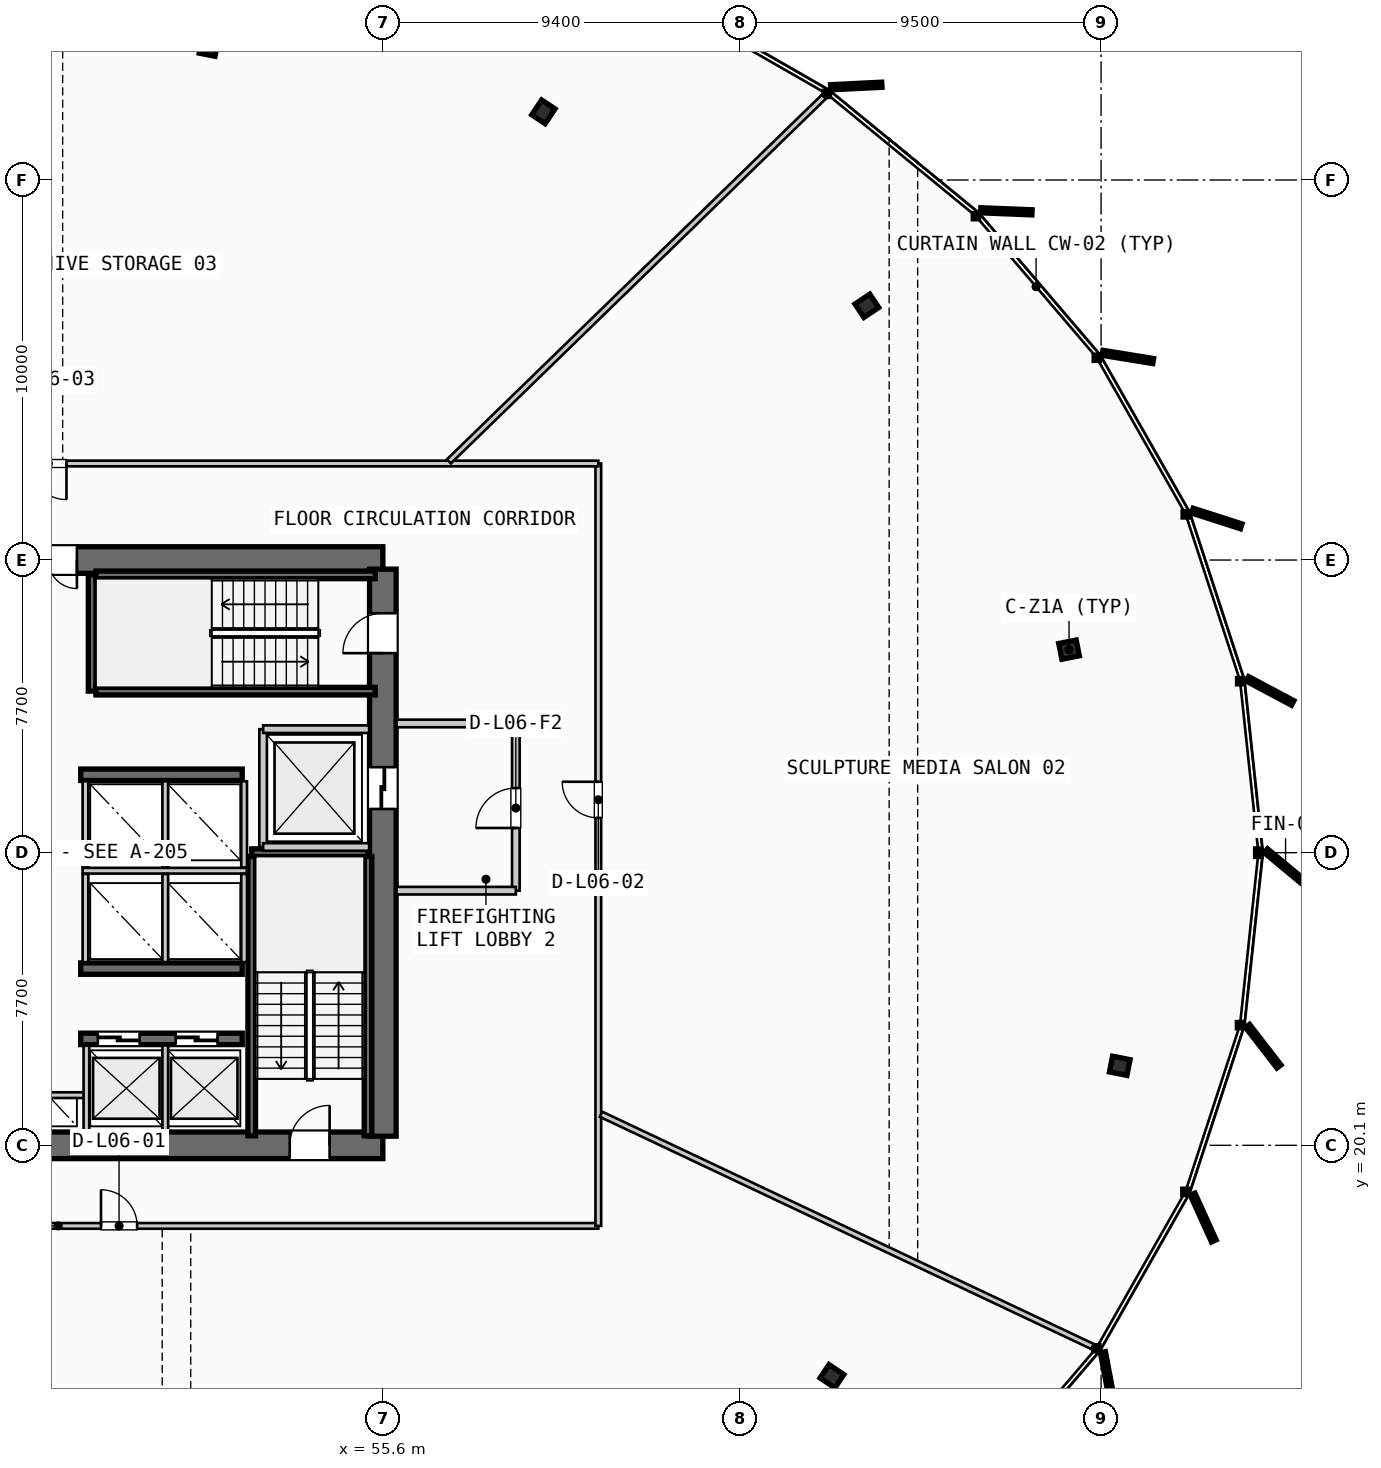
"""IFC4 building model, lengths in metres.
Left out: names, types, materials, properties, quantities, classifications, styles, units other than length and angle.
Written with IfcOpenShell. Run it as: python <this file> out.ifc"""

import sys

from ifc_helpers import new_model, si_unit, direction, frame, frame_2d, origin, origin_2d, place, context, subcontext, project, spatial, rectangle, i_section, extrude, source, transform, mapped, element, fill, save


model = new_model("IFC4")
c1 = context("Model", 3, precision=1e-05, world=origin(), true_north=direction((0.0, 1.0)))
c2 = subcontext(c1, "Body", "Model", "MODEL_VIEW")
j1 = project(units=[si_unit("LENGTHUNIT", "METRE"), si_unit("PLANEANGLEUNIT", "RADIAN")], contexts=[c1])
p1 = place(None, origin())
s1 = spatial("IfcSite", under=j1, at=p1, CompositionType="ELEMENT")
p2 = place(p1, origin())
s2 = spatial("IfcBuilding", under=s1, at=p2, CompositionType="ELEMENT")
p3 = place(p2, frame((0.0, 0.0, 29.6)))
s3 = spatial("IfcBuildingStorey", under=s2, at=p3, CompositionType="ELEMENT", Elevation=29.6)
p4 = place(p3, frame((38.0, 20.1, 0.0), z_axis=(0.0, 0.0, 1.0), x_axis=(1.0, 0.0, 0.0)))
e1 = element("IfcWall", 1, at=p4, inside=s3, PredefinedType="SHEAR", context=c2, shape_type="SweptSolid", body=[
    extrude(rectangle(XDim=17.6, YDim=0.7, at=frame_2d((8.8, 0.0))), origin(), (0.0, 0.0, 1.0), 3.55),
])
p5 = place(p4, frame((1.4, 0.0, 0.0)))
e2 = element("IfcOpeningElement", 2, at=p5, cuts=e1, PredefinedType="OPENING", context=c2, shape_type="SweptSolid", body=[
    extrude(rectangle(XDim=1.05, YDim=2.15, at=frame_2d((0.525, 1.075))), frame((0.0, 0.36, 0.0), z_axis=(0.0, -1.0, 0.0), x_axis=(1.0, 0.0, 0.0)), (0.0, 0.0, 1.0), 0.72),
])
p6 = place(p4, frame((15.15, 0.0, 0.0)))
e3 = element("IfcOpeningElement", 3, at=p6, cuts=e1, PredefinedType="OPENING", context=c2, shape_type="SweptSolid", body=[
    extrude(rectangle(XDim=1.05, YDim=2.15, at=frame_2d((0.525, 1.075))), frame((0.0, 0.36, 0.0), z_axis=(0.0, -1.0, 0.0), x_axis=(1.0, 0.0, 0.0)), (0.0, 0.0, 1.0), 0.72),
])
p7 = place(p3, frame((55.6, 35.5, 0.0), z_axis=(0.0, 0.0, 1.0), x_axis=(-1.0, 0.0, 0.0)))
e4 = element("IfcWall", 4, at=p7, inside=s3, PredefinedType="SHEAR", context=c2, shape_type="SweptSolid", body=[
    extrude(rectangle(XDim=17.6, YDim=0.7, at=frame_2d((8.8, 0.0))), origin(), (0.0, 0.0, 1.0), 3.55),
])
p8 = place(p7, frame((8.05, 0.0, 0.0)))
e5 = element("IfcOpeningElement", 5, at=p8, cuts=e4, PredefinedType="OPENING", context=c2, shape_type="SweptSolid", body=[
    extrude(rectangle(XDim=1.5, YDim=2.2, at=frame_2d((0.75, 1.1))), frame((0.0, 0.36, 0.0), z_axis=(0.0, -1.0, 0.0), x_axis=(1.0, 0.0, 0.0)), (0.0, 0.0, 1.0), 0.72),
])
p9 = place(p7, frame((14.95, 0.0, 0.0)))
e6 = element("IfcOpeningElement", 6, at=p9, cuts=e4, PredefinedType="OPENING", context=c2, shape_type="SweptSolid", body=[
    extrude(rectangle(XDim=1.4, YDim=2.3, at=frame_2d((0.7, 1.15))), frame((0.0, 0.36, 0.0), z_axis=(0.0, -1.0, 0.0), x_axis=(1.0, 0.0, 0.0)), (0.0, 0.0, 1.0), 0.72),
])
p10 = place(p7, frame((12.3, 0.0, 0.0)))
e7 = element("IfcOpeningElement", 7, at=p10, cuts=e4, PredefinedType="OPENING", context=c2, shape_type="SweptSolid", body=[
    extrude(rectangle(XDim=0.95, YDim=2.15, at=frame_2d((0.475, 1.075))), frame((0.0, 0.36, 0.0), z_axis=(0.0, -1.0, 0.0), x_axis=(1.0, 0.0, 0.0)), (0.0, 0.0, 1.0), 0.72),
])
p11 = place(p7, frame((10.2, 0.0, 0.0)))
e8 = element("IfcOpeningElement", 8, at=p11, cuts=e4, PredefinedType="OPENING", context=c2, shape_type="SweptSolid", body=[
    extrude(rectangle(XDim=0.9, YDim=2.15, at=frame_2d((0.45, 1.075))), frame((0.0, 0.36, 0.0), z_axis=(0.0, -1.0, 0.0), x_axis=(1.0, 0.0, 0.0)), (0.0, 0.0, 1.0), 0.72),
])
p12 = place(p3, frame((55.6, 20.34, 0.0), z_axis=(0.0, 0.0, 1.0), x_axis=(0.0, 1.0, 0.0)))
e9 = element("IfcWall", 9, at=p12, inside=s3, PredefinedType="SHEAR", context=c2, shape_type="SweptSolid", body=[
    extrude(rectangle(XDim=14.92, YDim=0.7, at=frame_2d((7.46, 0.0))), origin(), (0.0, 0.0, 1.0), 3.55),
])
p13 = place(p12, frame((12.71, 0.0, 0.0)))
e10 = element("IfcOpeningElement", 10, at=p13, cuts=e9, PredefinedType="OPENING", context=c2, shape_type="SweptSolid", body=[
    extrude(rectangle(XDim=1.05, YDim=2.15, at=frame_2d((0.525, 1.075))), frame((0.0, 0.36, 0.0), z_axis=(0.0, -1.0, 0.0), x_axis=(1.0, 0.0, 0.0)), (0.0, 0.0, 1.0), 0.72),
])
p14 = place(p12, frame((8.61, 0.0, 0.0)))
e11 = element("IfcOpeningElement", 11, at=p14, cuts=e9, PredefinedType="OPENING", context=c2, shape_type="SweptSolid", body=[
    extrude(rectangle(XDim=1.1, YDim=2.2, at=frame_2d((0.55, 1.1))), frame((0.0, 0.36, 0.0), z_axis=(0.0, -1.0, 0.0), x_axis=(1.0, 0.0, 0.0)), (0.0, 0.0, 1.0), 0.72),
])
p15 = place(p3, frame((47.65, 22.9, 0.0), z_axis=(0.0, 0.0, 1.0), x_axis=(1.0, 0.0, 0.0)))
e12 = element("IfcWall", 12, at=p15, inside=s3, PredefinedType="SHEAR", context=c2, shape_type="SweptSolid", body=[
    extrude(rectangle(XDim=4.25, YDim=0.3, at=frame_2d((2.125, 0.0))), origin(), (0.0, 0.0, 1.0), 3.55),
])
p16 = place(p15, frame((0.45, 0.0, 0.0)))
e13 = element("IfcOpeningElement", 13, at=p16, cuts=e12, PredefinedType="OPENING", context=c2, shape_type="SweptSolid", body=[
    extrude(rectangle(XDim=1.1, YDim=2.2, at=frame_2d((0.55, 1.1))), frame((0.0, 0.16, 0.0), z_axis=(0.0, -1.0, 0.0), x_axis=(1.0, 0.0, 0.0)), (0.0, 0.0, 1.0), 0.32),
])
p17 = place(p15, frame((2.5, 0.0, 0.0)))
e14 = element("IfcOpeningElement", 14, at=p17, cuts=e12, PredefinedType="OPENING", context=c2, shape_type="SweptSolid", body=[
    extrude(rectangle(XDim=1.1, YDim=2.2, at=frame_2d((0.55, 1.1))), frame((0.0, 0.16, 0.0), z_axis=(0.0, -1.0, 0.0), x_axis=(1.0, 0.0, 0.0)), (0.0, 0.0, 1.0), 0.32),
])
for number, where, z_axis, x_axis in (
    (15, (47.65, 24.75, 0.0), (0.0, 0.0, 1.0), (1.0, 0.0, 0.0)),
    (16, (47.65, 29.85, 0.0), (0.0, 0.0, 1.0), (1.0, 0.0, 0.0)),
):
    element("IfcWall", number, at=place(p3, frame(where, z_axis=z_axis, x_axis=x_axis)), inside=s3, PredefinedType="SHEAR", context=c2, shape_type="SweptSolid", body=[
        extrude(rectangle(XDim=4.25, YDim=0.3, at=frame_2d((2.125, 0.0))), origin(), (0.0, 0.0, 1.0), 3.55),
    ])
m1 = source(origin(), c2, "Body", "SweptSolid", [
    extrude(i_section(OverallWidth=0.423, OverallDepth=0.469, WebThickness=0.051, FlangeThickness=0.081, FilletRadius=0.015, at=origin_2d()), origin(), (0.0, 0.0, 1.0), 3.55),
])
for number, where, z_axis, x_axis in (
    (17, (73.657, 33.142, 0.0), (0.0, 0.0, 1.0), (0.981, 0.195, 0.0)),
    (18, (68.336, 42.19, 0.0), (0.0, 0.0, 1.0), (0.831, 0.556, 0.0)),
    (19, (59.825, 47.293, 0.0), (0.0, 0.0, 1.0), (0.556, 0.831, 0.0)),
    (20, (51.022, 49.026, 0.0), (0.0, 0.0, 1.0), (0.195, 0.981, 0.0)),
    (21, (67.418, 14.023, 0.0), (0.0, 0.0, 1.0), (0.831, -0.556, 0.0)),
    (22, (74.991, 22.192, 0.0), (0.0, 0.0, 1.0), (0.981, -0.195, 0.0)),
):
    element("IfcColumn", number, at=place(p3, frame(where, z_axis=z_axis, x_axis=x_axis)), inside=s3, PredefinedType="COLUMN", context=c2, shape_type="MappedRepresentation", body=[
        mapped(m1, transform((0.0, 0.0, 0.0), scale=1.0)),
    ])
p18 = place(p3, frame((52.15, 27.8, 0.0), z_axis=(0.0, 0.0, 1.0), x_axis=(1.0, 0.0, 0.0)))
e23 = element("IfcWall", 23, at=p18, inside=s3, PredefinedType="SHEAR", context=c2, shape_type="SweptSolid", body=[
    extrude(rectangle(XDim=3.06, YDim=0.2, at=frame_2d((1.53, 0.0))), origin(), (0.0, 0.0, 1.0), 3.55),
])
for number, where, z_axis, x_axis in (
    (24, (55.21, 27.7, 0.0), (0.0, 0.0, 1.0), (0.0, -1.0, 0.0)),
    (25, (52.15, 20.35, 0.0), (0.0, 0.0, 1.0), (0.0, 1.0, 0.0)),
):
    element("IfcWall", number, at=place(p3, frame(where, z_axis=z_axis, x_axis=x_axis)), inside=s3, PredefinedType="SHEAR", context=c2, shape_type="SweptSolid", body=[
        extrude(rectangle(XDim=7.35, YDim=0.2, at=frame_2d((3.675, 0.0))), origin(), (0.0, 0.0, 1.0), 3.55),
    ])
p19 = place(p3, frame((47.95, 32.05, 0.0), z_axis=(0.0, 0.0, 1.0), x_axis=(0.0, 1.0, 0.0)))
e26 = element("IfcWall", 26, at=p19, inside=s3, PredefinedType="SHEAR", context=c2, shape_type="SweptSolid", body=[
    extrude(rectangle(XDim=3.06, YDim=0.2, at=frame_2d((1.53, 0.0))), origin(), (0.0, 0.0, 1.0), 3.55),
])
for number, where, z_axis, x_axis in (
    (27, (48.05, 35.11, 0.0), (0.0, 0.0, 1.0), (1.0, 0.0, 0.0)),
    (28, (55.4, 32.05, 0.0), (0.0, 0.0, 1.0), (-1.0, 0.0, 0.0)),
):
    element("IfcWall", number, at=place(p3, frame(where, z_axis=z_axis, x_axis=x_axis)), inside=s3, PredefinedType="SHEAR", context=c2, shape_type="SweptSolid", body=[
        extrude(rectangle(XDim=7.35, YDim=0.2, at=frame_2d((3.675, 0.0))), origin(), (0.0, 0.0, 1.0), 3.55),
    ])
p20 = place(p3, frame((45.8, 21.42, 0.0), z_axis=(0.0, 0.0, 1.0), x_axis=(1.0, 0.0, 0.0)))
e29 = element("IfcWall", 29, at=p20, inside=s3, PredefinedType="PARTITIONING", context=c2, shape_type="SweptSolid", body=[
    extrude(rectangle(XDim=2.0, YDim=0.15, at=frame_2d((1.0, 0.0))), origin(), (0.0, 0.0, 1.0), 2.925),
])
p21 = place(p3, frame((47.8, 20.48, 0.0), z_axis=(0.0, 0.0, 1.0), x_axis=(0.0, 1.0, 0.0)))
e30 = element("IfcWall", 30, at=p21, inside=s3, PredefinedType="PARTITIONING", context=c2, shape_type="SweptSolid", body=[
    extrude(rectangle(XDim=2.24, YDim=0.15, at=frame_2d((1.12, 0.0))), origin(), (0.0, 0.0, 1.0), 2.925),
])
p22 = place(p3, frame((52.45, 27.95, 0.0), z_axis=(0.0, 0.0, 1.0), x_axis=(0.0, 1.0, 0.0)))
e31 = element("IfcWall", 31, at=p22, inside=s3, PredefinedType="PARTITIONING", context=c2, shape_type="SweptSolid", body=[
    extrude(rectangle(XDim=3.1, YDim=0.2, at=frame_2d((1.55, 0.0))), origin(), (0.0, 0.0, 1.0), 2.925),
])
for number, where, z_axis, x_axis in (
    (32, (52.45, 27.95, 0.0), (0.0, 0.0, 1.0), (1.0, 0.0, 0.0)),
    (33, (52.45, 31.05, 0.0), (0.0, 0.0, 1.0), (1.0, 0.0, 0.0)),
):
    element("IfcWall", number, at=place(p3, frame(where, z_axis=z_axis, x_axis=x_axis)), inside=s3, PredefinedType="PARTITIONING", context=c2, shape_type="SweptSolid", body=[
        extrude(rectangle(XDim=2.79, YDim=0.2, at=frame_2d((1.395, 0.0))), origin(), (0.0, 0.0, 1.0), 2.925),
    ])
p23 = place(p3, frame((59.1, 26.8, 0.0), z_axis=(0.0, 0.0, 1.0), x_axis=(0.0, 1.0, 0.0)))
e34 = element("IfcWall", 34, at=p23, inside=s3, PredefinedType="PARTITIONING", context=c2, shape_type="SweptSolid", body=[
    extrude(rectangle(XDim=4.4, YDim=0.2, at=frame_2d((2.2, 0.0))), origin(), (0.0, 0.0, 1.0), 2.925),
])
p24 = place(p23, frame((1.65, 0.0, 0.0)))
e35 = element("IfcOpeningElement", 35, at=p24, cuts=e34, PredefinedType="OPENING", context=c2, shape_type="SweptSolid", body=[
    extrude(rectangle(XDim=1.05, YDim=2.15, at=frame_2d((0.525, 1.075))), frame((0.0, 0.11, 0.0), z_axis=(0.0, -1.0, 0.0), x_axis=(1.0, 0.0, 0.0)), (0.0, 0.0, 1.0), 0.22),
])
for number, where, z_axis, x_axis in (
    (36, (55.96, 26.8, 0.0), (0.0, 0.0, 1.0), (1.0, 0.0, 0.0)),
    (37, (55.96, 31.2, 0.0), (0.0, 0.0, 1.0), (1.0, 0.0, 0.0)),
):
    element("IfcWall", number, at=place(p3, frame(where, z_axis=z_axis, x_axis=x_axis)), inside=s3, PredefinedType="PARTITIONING", context=c2, shape_type="SweptSolid", body=[
        extrude(rectangle(XDim=3.14, YDim=0.2, at=frame_2d((1.57, 0.0))), origin(), (0.0, 0.0, 1.0), 2.925),
    ])
p25 = place(p3, frame((49.875, 20.46, 0.0), z_axis=(0.0, 0.0, 1.0), x_axis=(0.0, 1.0, 0.0)))
e38 = element("IfcWall", 38, at=p25, inside=s3, PredefinedType="PARTITIONING", context=c2, shape_type="SweptSolid", body=[
    extrude(rectangle(XDim=2.27, YDim=0.15, at=frame_2d((1.135, 0.0))), origin(), (0.0, 0.0, 1.0), 2.925),
])
p26 = place(p3, frame((47.7, 27.325, 0.0), z_axis=(0.0, 0.0, 1.0), x_axis=(1.0, 0.0, 0.0)))
e39 = element("IfcWall", 39, at=p26, inside=s3, PredefinedType="PARTITIONING", context=c2, shape_type="SweptSolid", body=[
    extrude(rectangle(XDim=4.32, YDim=0.15, at=frame_2d((2.16, 0.0))), origin(), (0.0, 0.0, 1.0), 2.925),
])
for number, where, z_axis, x_axis in (
    (40, (47.775, 24.92, 0.0), (0.0, 0.0, 1.0), (0.0, 1.0, 0.0)),
    (41, (49.875, 24.92, 0.0), (0.0, 0.0, 1.0), (0.0, 1.0, 0.0)),
    (42, (51.95, 24.92, 0.0), (0.0, 0.0, 1.0), (0.0, 1.0, 0.0)),
):
    element("IfcWall", number, at=place(p3, frame(where, z_axis=z_axis, x_axis=x_axis)), inside=s3, PredefinedType="PARTITIONING", context=c2, shape_type="SweptSolid", body=[
        extrude(rectangle(XDim=2.32, YDim=0.15, at=frame_2d((1.16, 0.0))), origin(), (0.0, 0.0, 1.0), 2.925),
    ])
for number, where, z_axis, x_axis in (
    (43, (47.775, 27.41, 0.0), (0.0, 0.0, 1.0), (0.0, 1.0, 0.0)),
    (44, (49.875, 27.41, 0.0), (0.0, 0.0, 1.0), (0.0, 1.0, 0.0)),
    (45, (51.95, 27.41, 0.0), (0.0, 0.0, 1.0), (0.0, 1.0, 0.0)),
):
    element("IfcWall", number, at=place(p3, frame(where, z_axis=z_axis, x_axis=x_axis)), inside=s3, PredefinedType="PARTITIONING", context=c2, shape_type="SweptSolid", body=[
        extrude(rectangle(XDim=2.27, YDim=0.15, at=frame_2d((1.135, 0.0))), origin(), (0.0, 0.0, 1.0), 2.925),
    ])
p27 = place(p3, frame((32.85, 17.98, 0.0), z_axis=(0.0, 0.0, 1.0), x_axis=(1.0, 0.0, 0.0)))
e46 = element("IfcWall", 46, at=p27, inside=s3, PredefinedType="PARTITIONING", context=c2, shape_type="SweptSolid", body=[
    extrude(rectangle(XDim=28.42, YDim=0.15, at=frame_2d((14.21, 0.0))), origin(), (0.0, 0.0, 1.0), 2.925),
])
p28 = place(p27, frame((15.334, 0.0, 0.0)))
e47 = element("IfcOpeningElement", 47, at=p28, cuts=e46, PredefinedType="OPENING", context=c2, shape_type="SweptSolid", body=[
    extrude(rectangle(XDim=0.95, YDim=2.15, at=frame_2d((0.475, 1.075))), frame((0.0, 0.085, 0.0), z_axis=(0.0, -1.0, 0.0), x_axis=(1.0, 0.0, 0.0)), (0.0, 0.0, 1.0), 0.17),
])
p29 = place(p3, frame((61.27, 17.98, 0.0), z_axis=(0.0, 0.0, 1.0), x_axis=(0.0, 1.0, 0.0)))
e48 = element("IfcWall", 48, at=p29, inside=s3, PredefinedType="PARTITIONING", context=c2, shape_type="SweptSolid", body=[
    extrude(rectangle(XDim=20.06, YDim=0.15, at=frame_2d((10.03, 0.0))), origin(), (0.0, 0.0, 1.0), 2.925),
])
p30 = place(p29, frame((10.736, 0.0, 0.0)))
e49 = element("IfcOpeningElement", 49, at=p30, cuts=e48, PredefinedType="OPENING", context=c2, shape_type="SweptSolid", body=[
    extrude(rectangle(XDim=0.95, YDim=2.15, at=frame_2d((0.475, 1.075))), frame((0.0, 0.085, 0.0), z_axis=(0.0, -1.0, 0.0), x_axis=(1.0, 0.0, 0.0)), (0.0, 0.0, 1.0), 0.17),
])
p31 = place(p3, frame((61.27, 38.04, 0.0), z_axis=(0.0, 0.0, 1.0), x_axis=(-1.0, 0.0, 0.0)))
e50 = element("IfcWall", 50, at=p31, inside=s3, PredefinedType="PARTITIONING", context=c2, shape_type="SweptSolid", body=[
    extrude(rectangle(XDim=28.42, YDim=0.15, at=frame_2d((14.21, 0.0))), origin(), (0.0, 0.0, 1.0), 2.925),
])
p32 = place(p31, frame((13.995, 0.0, 0.0)))
e51 = element("IfcOpeningElement", 51, at=p32, cuts=e50, PredefinedType="OPENING", context=c2, shape_type="SweptSolid", body=[
    extrude(rectangle(XDim=0.95, YDim=2.15, at=frame_2d((0.475, 1.075))), frame((0.0, 0.085, 0.0), z_axis=(0.0, -1.0, 0.0), x_axis=(1.0, 0.0, 0.0)), (0.0, 0.0, 1.0), 0.17),
])
p33 = place(p3, frame((61.342, 20.917, 0.0), z_axis=(0.0, 0.0, 1.0), x_axis=(0.904140604409, -0.427235026021, 0.0)))
e52 = element("IfcWall", 52, at=p33, inside=s3, PredefinedType="PARTITIONING", context=c2, shape_type="SweptSolid", body=[
    extrude(rectangle(XDim=14.303, YDim=0.15, at=frame_2d((7.152, 0.0))), origin(), (0.0, 0.0, 1.0), 2.925),
])
p34 = place(p3, frame((57.339, 38.096, 0.0), z_axis=(0.0, 0.0, 1.0), x_axis=(0.71692792253, 0.697147297131, 0.0)))
e53 = element("IfcWall", 53, at=p34, inside=s3, PredefinedType="PARTITIONING", context=c2, shape_type="SweptSolid", body=[
    extrude(rectangle(XDim=13.762, YDim=0.15, at=frame_2d((6.881, 0.0))), origin(), (0.0, 0.0, 1.0), 2.925),
])
m2 = source(origin(), c2, "Body", "SweptSolid", [
    extrude(rectangle(XDim=1.05, YDim=2.15, at=frame_2d((0.525, 1.075))), frame((0.0, 0.025, 0.0), z_axis=(0.0, -1.0, 0.0), x_axis=(1.0, 0.0, 0.0)), (0.0, 0.0, 1.0), 0.05),
])
p35 = place(p6, origin())
e54 = element("IfcDoor", 54, at=p35, inside=s3, OperationType="SINGLE_SWING_RIGHT", PredefinedType="DOOR", context=c2, shape_type="MappedRepresentation", body=[
    mapped(m2, transform((0.0, 0.0, 0.0), scale=1.0)),
])
fill(e3, e54)
p36 = place(p13, origin())
e55 = element("IfcDoor", 55, at=p36, inside=s3, OperationType="SINGLE_SWING_LEFT", PredefinedType="DOOR", context=c2, shape_type="MappedRepresentation", body=[
    mapped(m2, transform((0.0, 0.0, 0.0), scale=1.0)),
])
fill(e10, e55)
m3 = source(origin(), c2, "Body", "SweptSolid", [
    extrude(rectangle(XDim=1.5, YDim=2.2, at=frame_2d((0.75, 1.1))), frame((0.0, 0.025, 0.0), z_axis=(0.0, -1.0, 0.0), x_axis=(1.0, 0.0, 0.0)), (0.0, 0.0, 1.0), 0.05),
])
p37 = place(p8, origin())
e56 = element("IfcDoor", 56, at=p37, inside=s3, OperationType="DOUBLE_DOOR_SINGLE_SWING", PredefinedType="DOOR", context=c2, shape_type="MappedRepresentation", body=[
    mapped(m3, transform((0.0, 0.0, 0.0), scale=1.0)),
])
fill(e5, e56)
m4 = source(origin(), c2, "Body", "SweptSolid", [
    extrude(rectangle(XDim=1.1, YDim=2.2, at=frame_2d((0.55, 1.1))), frame((0.0, 0.025, 0.0), z_axis=(0.0, -1.0, 0.0), x_axis=(1.0, 0.0, 0.0)), (0.0, 0.0, 1.0), 0.05),
])
p38 = place(p14, origin())
e57 = element("IfcDoor", 57, at=p38, inside=s3, OperationType="SLIDING_TO_RIGHT", PredefinedType="DOOR", context=c2, shape_type="MappedRepresentation", body=[
    mapped(m4, transform((0.0, 0.0, 0.0), scale=1.0)),
])
fill(e11, e57)
p39 = place(p16, origin())
e58 = element("IfcDoor", 58, at=p39, inside=s3, OperationType="SLIDING_TO_LEFT", PredefinedType="DOOR", context=c2, shape_type="MappedRepresentation", body=[
    mapped(m4, transform((0.0, 0.0, 0.0), scale=1.0)),
])
fill(e13, e58)
p40 = place(p17, origin())
e59 = element("IfcDoor", 59, at=p40, inside=s3, OperationType="SLIDING_TO_LEFT", PredefinedType="DOOR", context=c2, shape_type="MappedRepresentation", body=[
    mapped(m4, transform((0.0, 0.0, 0.0), scale=1.0)),
])
fill(e14, e59)
p41 = place(p24, origin())
e60 = element("IfcDoor", 60, at=p41, inside=s3, OperationType="SINGLE_SWING_LEFT", PredefinedType="DOOR", context=c2, shape_type="MappedRepresentation", body=[
    mapped(m2, transform((0.0, 0.0, 0.0), scale=1.0)),
])
fill(e35, e60)
m5 = source(origin(), c2, "Body", "SweptSolid", [
    extrude(rectangle(XDim=0.95, YDim=2.15, at=frame_2d((0.475, 1.075))), frame((0.0, 0.025, 0.0), z_axis=(0.0, -1.0, 0.0), x_axis=(1.0, 0.0, 0.0)), (0.0, 0.0, 1.0), 0.05),
])
p42 = place(p28, origin())
e61 = element("IfcDoor", 61, at=p42, inside=s3, OperationType="SINGLE_SWING_LEFT", PredefinedType="DOOR", context=c2, shape_type="MappedRepresentation", body=[
    mapped(m5, transform((0.0, 0.0, 0.0), scale=1.0)),
])
fill(e47, e61)
p43 = place(p30, origin())
e62 = element("IfcDoor", 62, at=p43, inside=s3, OperationType="SINGLE_SWING_RIGHT", PredefinedType="DOOR", context=c2, shape_type="MappedRepresentation", body=[
    mapped(m5, transform((0.0, 0.0, 0.0), scale=1.0)),
])
fill(e49, e62)
p44 = place(p32, origin())
e63 = element("IfcDoor", 63, at=p44, inside=s3, OperationType="SINGLE_SWING_LEFT", PredefinedType="DOOR", context=c2, shape_type="MappedRepresentation", body=[
    mapped(m5, transform((0.0, 0.0, 0.0), scale=1.0)),
])
fill(e51, e63)
save(model, sys.argv[1])
